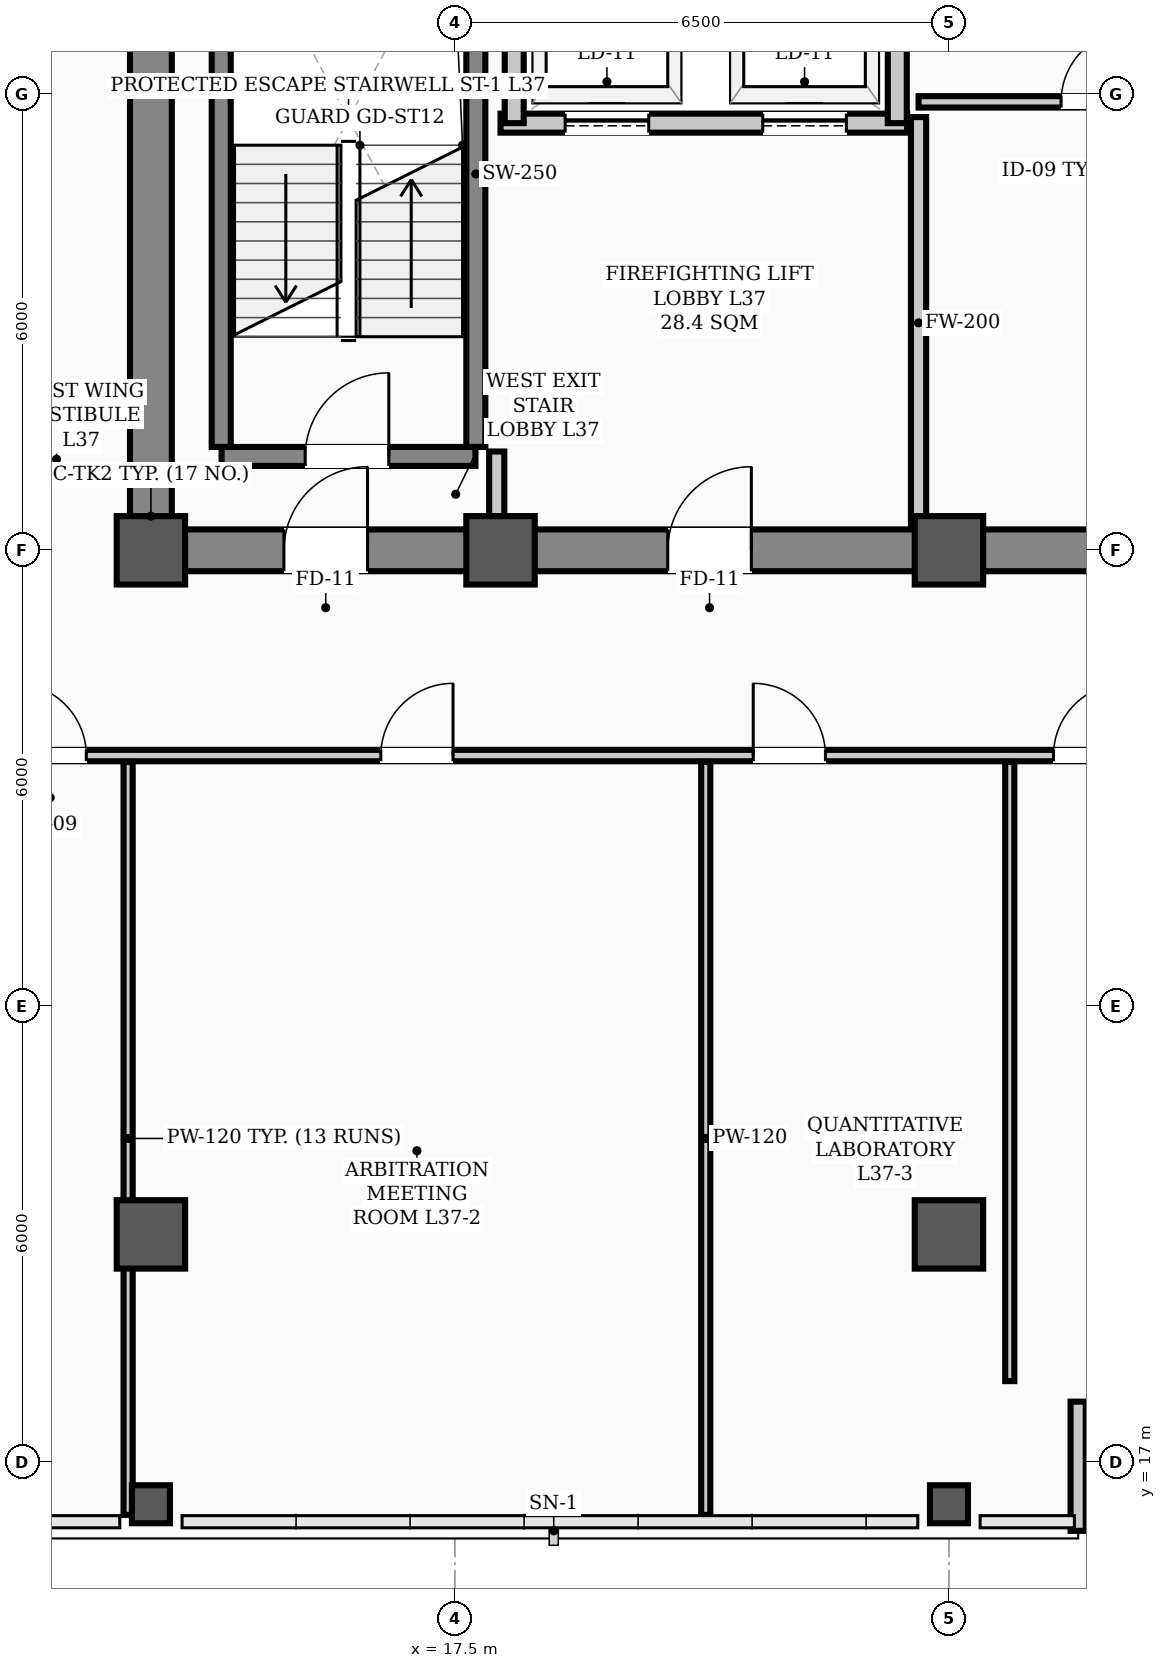
"""IFC4 building model, lengths in metres.
Left out: names, types, materials, properties, quantities, classifications, styles, units other than length and angle.
Written with IfcOpenShell. Run it as: python <this file> out.ifc"""

import sys

from ifc_helpers import new_model, si_unit, direction, frame, frame_2d, origin, origin_2d, place, context, subcontext, project, spatial, rectangle, hollow_rectangle, extrude, element, fill, save


model = new_model("IFC4")
c1 = context("Model", 3, precision=1e-05, world=origin(), true_north=direction((0.0, 1.0)))
c2 = subcontext(c1, "Body", "Model", "MODEL_VIEW")
j1 = project(units=[si_unit("LENGTHUNIT", "METRE"), si_unit("PLANEANGLEUNIT", "RADIAN")], contexts=[c1])
p1 = place(None, origin())
s1 = spatial("IfcSite", under=j1, at=p1, CompositionType="ELEMENT")
p2 = place(p1, origin())
s2 = spatial("IfcBuilding", under=s1, at=p2, CompositionType="ELEMENT")
p3 = place(p2, frame((0.0, 0.0, 150.0)))
s3 = spatial("IfcBuildingStorey", under=s2, at=p3, CompositionType="ELEMENT", Elevation=150.0)
for number, where, z_axis, x_axis in (
    (1, (13.5, 29.0, 0.0), (0.0, 0.0, 1.0), (1.0, 0.0, 0.0)),
    (2, (18.1, 29.0, 0.0), (0.0, 0.0, 1.0), (1.0, 0.0, 0.0)),
    (3, (24.0, 29.0, 0.0), (0.0, 0.0, 1.0), (1.0, 0.0, 0.0)),
    (4, (13.5, 20.0, 0.0), (0.0, 0.0, 1.0), (1.0, 0.0, 0.0)),
    (5, (24.0, 20.0, 0.0), (0.0, 0.0, 1.0), (1.0, 0.0, 0.0)),
):
    element("IfcColumn", number, at=place(p3, frame(where, z_axis=z_axis, x_axis=x_axis)), inside=s3, PredefinedType="COLUMN", context=c2, shape_type="SweptSolid", body=[
        extrude(hollow_rectangle(XDim=0.9, YDim=0.9, WallThickness=0.035, InnerFilletRadius=0.017, OuterFilletRadius=0.052, at=origin_2d()), origin(), (0.0, 0.0, 1.0), 3.9),
    ])
for number, where, z_axis, x_axis in (
    (6, (13.5, 16.45, 0.0), (0.0, 0.0, 1.0), (1.0, 0.0, 0.0)),
    (7, (24.0, 16.45, 0.0), (0.0, 0.0, 1.0), (1.0, 0.0, 0.0)),
):
    element("IfcColumn", number, at=place(p3, frame(where, z_axis=z_axis, x_axis=x_axis)), inside=s3, PredefinedType="COLUMN", context=c2, shape_type="SweptSolid", body=[
        extrude(hollow_rectangle(XDim=0.5, YDim=0.5, WallThickness=0.024, InnerFilletRadius=0.012, OuterFilletRadius=0.036, at=origin_2d()), origin(), (0.0, 0.0, 1.0), 3.9),
    ])
p4 = place(p3, frame((25.7, 16.1, 0.0), z_axis=(0.0, 0.0, 1.0), x_axis=(0.0, 1.0, 0.0)))
e8 = element("IfcWall", 8, at=p4, inside=s3, PredefinedType="PARAPET", context=c2, shape_type="SweptSolid", body=[
    extrude(rectangle(XDim=1.7, YDim=0.2, at=frame_2d((0.85, 0.0))), origin(), (0.0, 0.0, 1.0), 1.2),
])
p5 = place(p3, frame((13.5, 29.0, 0.0), z_axis=(0.0, 0.0, 1.0), x_axis=(1.0, 0.0, 0.0)))
e9 = element("IfcWall", 9, at=p5, inside=s3, PredefinedType="SHEAR", context=c2, shape_type="SweptSolid", body=[
    extrude(rectangle(XDim=30.5, YDim=0.55, at=frame_2d((15.25, 0.0))), origin(), (0.0, 0.0, 1.0), 3.72),
])
p6 = place(p5, frame((1.75, 0.0, 0.0)))
e10 = element("IfcOpeningElement", 10, at=p6, cuts=e9, PredefinedType="OPENING", context=c2, shape_type="SweptSolid", body=[
    extrude(rectangle(XDim=1.1, YDim=2.08, at=frame_2d((0.55, 1.04))), frame((0.0, 0.285, 0.0), z_axis=(0.0, -1.0, 0.0), x_axis=(1.0, 0.0, 0.0)), (0.0, 0.0, 1.0), 0.57),
])
p7 = place(p5, frame((26.7, 0.0, 0.0)))
e11 = element("IfcOpeningElement", 11, at=p7, cuts=e9, PredefinedType="OPENING", context=c2, shape_type="SweptSolid", body=[
    extrude(rectangle(XDim=1.1, YDim=2.08, at=frame_2d((0.55, 1.04))), frame((0.0, 0.285, 0.0), z_axis=(0.0, -1.0, 0.0), x_axis=(1.0, 0.0, 0.0)), (0.0, 0.0, 1.0), 0.57),
])
p8 = place(p5, frame((6.8, 0.0, 0.0)))
e12 = element("IfcOpeningElement", 12, at=p8, cuts=e9, PredefinedType="OPENING", context=c2, shape_type="SweptSolid", body=[
    extrude(rectangle(XDim=1.1, YDim=2.08, at=frame_2d((0.55, 1.04))), frame((0.0, 0.285, 0.0), z_axis=(0.0, -1.0, 0.0), x_axis=(1.0, 0.0, 0.0)), (0.0, 0.0, 1.0), 0.57),
])
p9 = place(p5, frame((13.2, 0.0, 0.0)))
e13 = element("IfcOpeningElement", 13, at=p9, cuts=e9, PredefinedType="OPENING", context=c2, shape_type="SweptSolid", body=[
    extrude(rectangle(XDim=1.6, YDim=2.08, at=frame_2d((0.8, 1.04))), frame((0.0, 0.285, 0.0), z_axis=(0.0, -1.0, 0.0), x_axis=(1.0, 0.0, 0.0)), (0.0, 0.0, 1.0), 0.57),
])
p10 = place(p5, frame((19.5, 0.0, 0.0)))
e14 = element("IfcOpeningElement", 14, at=p10, cuts=e9, PredefinedType="OPENING", context=c2, shape_type="SweptSolid", body=[
    extrude(rectangle(XDim=0.9, YDim=2.08, at=frame_2d((0.45, 1.04))), frame((0.0, 0.285, 0.0), z_axis=(0.0, -1.0, 0.0), x_axis=(1.0, 0.0, 0.0)), (0.0, 0.0, 1.0), 0.57),
])
p11 = place(p5, frame((21.55, 0.0, 0.0)))
e15 = element("IfcOpeningElement", 15, at=p11, cuts=e9, PredefinedType="OPENING", context=c2, shape_type="SweptSolid", body=[
    extrude(rectangle(XDim=0.9, YDim=2.08, at=frame_2d((0.45, 1.04))), frame((0.0, 0.285, 0.0), z_axis=(0.0, -1.0, 0.0), x_axis=(1.0, 0.0, 0.0)), (0.0, 0.0, 1.0), 0.57),
])
p12 = place(p3, frame((13.5, 29.35, 0.0), z_axis=(0.0, 0.0, 1.0), x_axis=(0.0, 1.0, 0.0)))
e16 = element("IfcWall", 16, at=p12, inside=s3, PredefinedType="SHEAR", context=c2, shape_type="SweptSolid", body=[
    extrude(rectangle(XDim=8.6, YDim=0.55, at=frame_2d((4.3, 0.0))), origin(), (0.0, 0.0, 1.0), 3.72),
])
p13 = place(p3, frame((14.43, 30.235, 0.0), z_axis=(0.0, 0.0, 1.0), x_axis=(1.0, 0.0, 0.0)))
e17 = element("IfcWall", 17, at=p13, inside=s3, PredefinedType="STANDARD", context=c2, shape_type="SweptSolid", body=[
    extrude(rectangle(XDim=3.34, YDim=0.25, at=frame_2d((1.67, 0.0))), origin(), (0.0, 0.0, 1.0), 3.72),
])
p14 = place(p13, frame((1.1, 0.0, 0.0)))
e18 = element("IfcOpeningElement", 18, at=p14, cuts=e17, PredefinedType="OPENING", context=c2, shape_type="SweptSolid", body=[
    extrude(rectangle(XDim=1.1, YDim=2.08, at=frame_2d((0.55, 1.04))), frame((0.0, 0.135, 0.0), z_axis=(0.0, -1.0, 0.0), x_axis=(1.0, 0.0, 0.0)), (0.0, 0.0, 1.0), 0.27),
])
for number, where, z_axis, x_axis in (
    (19, (14.425, 30.36, 0.0), (0.0, 0.0, 1.0), (0.0, 1.0, 0.0)),
    (20, (17.775, 30.36, 0.0), (0.0, 0.0, 1.0), (0.0, 1.0, 0.0)),
):
    element("IfcWall", number, at=place(p3, frame(where, z_axis=z_axis, x_axis=x_axis)), inside=s3, PredefinedType="STANDARD", context=c2, shape_type="SweptSolid", body=[
        extrude(rectangle(XDim=7.184, YDim=0.25, at=frame_2d((3.592, 0.0))), origin(), (0.0, 0.0, 1.0), 3.72),
    ])
p15 = place(p3, frame((18.1, 34.62, 0.0), z_axis=(0.0, 0.0, 1.0), x_axis=(1.0, 0.0, 0.0)))
e21 = element("IfcWall", 21, at=p15, inside=s3, PredefinedType="STANDARD", context=c2, shape_type="SweptSolid", body=[
    extrude(rectangle(XDim=5.35, YDim=0.25, at=frame_2d((2.675, 0.0))), origin(), (0.0, 0.0, 1.0), 3.72),
])
p16 = place(p15, frame((0.85, 0.0, 0.0)))
e22 = element("IfcOpeningElement", 22, at=p16, cuts=e21, PredefinedType="OPENING", context=c2, shape_type="SweptSolid", body=[
    extrude(rectangle(XDim=1.1, YDim=2.08, at=frame_2d((0.55, 1.04))), frame((0.0, 0.135, 0.0), z_axis=(0.0, -1.0, 0.0), x_axis=(1.0, 0.0, 0.0)), (0.0, 0.0, 1.0), 0.27),
])
p17 = place(p15, frame((3.45, 0.0, 0.0)))
e23 = element("IfcOpeningElement", 23, at=p17, cuts=e21, PredefinedType="OPENING", context=c2, shape_type="SweptSolid", body=[
    extrude(rectangle(XDim=1.1, YDim=2.08, at=frame_2d((0.55, 1.04))), frame((0.0, 0.135, 0.0), z_axis=(0.0, -1.0, 0.0), x_axis=(1.0, 0.0, 0.0)), (0.0, 0.0, 1.0), 0.27),
])
for number, where, z_axis, x_axis in (
    (24, (18.28, 34.62, 0.0), (0.0, 0.0, 1.0), (0.0, 1.0, 0.0)),
    (25, (23.32, 34.62, 0.0), (0.0, 0.0, 1.0), (0.0, 1.0, 0.0)),
):
    element("IfcWall", number, at=place(p3, frame(where, z_axis=z_axis, x_axis=x_axis)), inside=s3, PredefinedType="STANDARD", context=c2, shape_type="SweptSolid", body=[
        extrude(rectangle(XDim=3.33, YDim=0.25, at=frame_2d((1.665, 0.0))), origin(), (0.0, 0.0, 1.0), 3.35),
    ])
p18 = place(p3, frame((23.6, 34.9, 0.0), z_axis=(0.0, 0.0, 1.0), x_axis=(1.0, 0.0, 0.0)))
e26 = element("IfcWall", 26, at=p18, inside=s3, PredefinedType="PARTITIONING", context=c2, shape_type="SweptSolid", body=[
    extrude(rectangle(XDim=4.58, YDim=0.15, at=frame_2d((2.29, 0.0))), origin(), (0.0, 0.0, 1.0), 3.72),
])
p19 = place(p18, frame((1.875, 0.0, 0.0)))
e27 = element("IfcOpeningElement", 27, at=p19, cuts=e26, PredefinedType="OPENING", context=c2, shape_type="SweptSolid", body=[
    extrude(rectangle(XDim=0.95, YDim=2.08, at=frame_2d((0.475, 1.04))), frame((0.0, 0.085, 0.0), z_axis=(0.0, -1.0, 0.0), x_axis=(1.0, 0.0, 0.0)), (0.0, 0.0, 1.0), 0.17),
])
p20 = place(p3, frame((2.31, 26.3, 0.0), z_axis=(0.0, 0.0, 1.0), x_axis=(1.0, 0.0, 0.0)))
e28 = element("IfcWall", 28, at=p20, inside=s3, PredefinedType="PARTITIONING", context=c2, shape_type="SweptSolid", body=[
    extrude(rectangle(XDim=46.38, YDim=0.15, at=frame_2d((23.19, 0.0))), origin(), (0.0, 0.0, 1.0), 3.2),
])
p21 = place(p20, frame((9.39, 0.0, 0.0)))
e29 = element("IfcOpeningElement", 29, at=p21, cuts=e28, PredefinedType="OPENING", context=c2, shape_type="SweptSolid", body=[
    extrude(rectangle(XDim=0.95, YDim=2.08, at=frame_2d((0.475, 1.04))), frame((0.0, 0.085, 0.0), z_axis=(0.0, -1.0, 0.0), x_axis=(1.0, 0.0, 0.0)), (0.0, 0.0, 1.0), 0.17),
])
p22 = place(p20, frame((14.215, 0.0, 0.0)))
e30 = element("IfcOpeningElement", 30, at=p22, cuts=e28, PredefinedType="OPENING", context=c2, shape_type="SweptSolid", body=[
    extrude(rectangle(XDim=0.95, YDim=2.08, at=frame_2d((0.475, 1.04))), frame((0.0, 0.085, 0.0), z_axis=(0.0, -1.0, 0.0), x_axis=(1.0, 0.0, 0.0)), (0.0, 0.0, 1.0), 0.17),
])
p23 = place(p20, frame((19.115, 0.0, 0.0)))
e31 = element("IfcOpeningElement", 31, at=p23, cuts=e28, PredefinedType="OPENING", context=c2, shape_type="SweptSolid", body=[
    extrude(rectangle(XDim=0.95, YDim=2.08, at=frame_2d((0.475, 1.04))), frame((0.0, 0.085, 0.0), z_axis=(0.0, -1.0, 0.0), x_axis=(1.0, 0.0, 0.0)), (0.0, 0.0, 1.0), 0.17),
])
p24 = place(p20, frame((23.065, 0.0, 0.0)))
e32 = element("IfcOpeningElement", 32, at=p24, cuts=e28, PredefinedType="OPENING", context=c2, shape_type="SweptSolid", body=[
    extrude(rectangle(XDim=0.95, YDim=2.08, at=frame_2d((0.475, 1.04))), frame((0.0, 0.085, 0.0), z_axis=(0.0, -1.0, 0.0), x_axis=(1.0, 0.0, 0.0)), (0.0, 0.0, 1.0), 0.17),
])
p25 = place(p20, frame((37.715, 0.0, 0.0)))
e33 = element("IfcOpeningElement", 33, at=p25, cuts=e28, PredefinedType="OPENING", context=c2, shape_type="SweptSolid", body=[
    extrude(rectangle(XDim=0.95, YDim=2.08, at=frame_2d((0.475, 1.04))), frame((0.0, 0.085, 0.0), z_axis=(0.0, -1.0, 0.0), x_axis=(1.0, 0.0, 0.0)), (0.0, 0.0, 1.0), 0.17),
])
p26 = place(p20, frame((43.66, 0.0, 0.0)))
e34 = element("IfcOpeningElement", 34, at=p26, cuts=e28, PredefinedType="OPENING", context=c2, shape_type="SweptSolid", body=[
    extrude(rectangle(XDim=0.95, YDim=2.08, at=frame_2d((0.475, 1.04))), frame((0.0, 0.085, 0.0), z_axis=(0.0, -1.0, 0.0), x_axis=(1.0, 0.0, 0.0)), (0.0, 0.0, 1.0), 0.17),
])
p27 = place(p3, frame((18.05, 29.285, 0.0), z_axis=(0.0, 0.0, 1.0), x_axis=(0.0, 1.0, 0.0)))
e35 = element("IfcWall", 35, at=p27, inside=s3, PredefinedType="STANDARD", context=c2, shape_type="SweptSolid", body=[
    extrude(rectangle(XDim=1.015, YDim=0.2, at=frame_2d((0.508, 0.0))), origin(), (0.0, 0.0, 1.0), 3.35),
])
p28 = place(p3, frame((23.6, 29.285, 0.0), z_axis=(0.0, 0.0, 1.0), x_axis=(0.0, 1.0, 0.0)))
e36 = element("IfcWall", 36, at=p28, inside=s3, PredefinedType="STANDARD", context=c2, shape_type="SweptSolid", body=[
    extrude(rectangle(XDim=5.415, YDim=0.2, at=frame_2d((2.708, 0.0))), origin(), (0.0, 0.0, 1.0), 3.2),
])
for number, where, z_axis, x_axis in (
    (37, (13.2, 16.31, 0.0), (0.0, 0.0, 1.0), (0.0, 1.0, 0.0)),
    (38, (20.8, 16.31, 0.0), (0.0, 0.0, 1.0), (0.0, 1.0, 0.0)),
):
    element("IfcWall", number, at=place(p3, frame(where, z_axis=z_axis, x_axis=x_axis)), inside=s3, PredefinedType="PARTITIONING", context=c2, shape_type="SweptSolid", body=[
        extrude(rectangle(XDim=9.905, YDim=0.12, at=frame_2d((4.953, 0.0))), origin(), (0.0, 0.0, 1.0), 3.1),
    ])
p29 = place(p3, frame((24.8, 18.07, 0.0), z_axis=(0.0, 0.0, 1.0), x_axis=(0.0, 1.0, 0.0)))
e39 = element("IfcWall", 39, at=p29, inside=s3, PredefinedType="PARTITIONING", context=c2, shape_type="SweptSolid", body=[
    extrude(rectangle(XDim=8.145, YDim=0.12, at=frame_2d((4.073, 0.0))), origin(), (0.0, 0.0, 1.0), 3.1),
])
p30 = place(p14, origin())
e40 = element("IfcDoor", 40, at=p30, inside=s3, OperationType="SINGLE_SWING_RIGHT", PredefinedType="DOOR", context=c2, shape_type="SweptSolid", body=[
    extrude(rectangle(XDim=1.1, YDim=2.08, at=frame_2d((0.55, 1.04))), frame((0.0, 0.025, 0.0), z_axis=(0.0, -1.0, 0.0), x_axis=(1.0, 0.0, 0.0)), (0.0, 0.0, 1.0), 0.05),
])
fill(e18, e40)
p31 = place(p6, origin())
e41 = element("IfcDoor", 41, at=p31, inside=s3, OperationType="SINGLE_SWING_RIGHT", PredefinedType="DOOR", context=c2, shape_type="SweptSolid", body=[
    extrude(rectangle(XDim=1.1, YDim=2.08, at=frame_2d((0.55, 1.04))), frame((0.0, 0.025, 0.0), z_axis=(0.0, -1.0, 0.0), x_axis=(1.0, 0.0, 0.0)), (0.0, 0.0, 1.0), 0.05),
])
fill(e10, e41)
p32 = place(p8, origin())
e42 = element("IfcDoor", 42, at=p32, inside=s3, OperationType="SINGLE_SWING_RIGHT", PredefinedType="DOOR", context=c2, shape_type="SweptSolid", body=[
    extrude(rectangle(XDim=1.1, YDim=2.08, at=frame_2d((0.55, 1.04))), frame((0.0, 0.025, 0.0), z_axis=(0.0, -1.0, 0.0), x_axis=(1.0, 0.0, 0.0)), (0.0, 0.0, 1.0), 0.05),
])
fill(e12, e42)
p33 = place(p19, origin())
e43 = element("IfcDoor", 43, at=p33, inside=s3, OperationType="SINGLE_SWING_RIGHT", PredefinedType="DOOR", context=c2, shape_type="SweptSolid", body=[
    extrude(rectangle(XDim=0.95, YDim=2.08, at=frame_2d((0.475, 1.04))), frame((0.0, 0.025, 0.0), z_axis=(0.0, -1.0, 0.0), x_axis=(1.0, 0.0, 0.0)), (0.0, 0.0, 1.0), 0.05),
])
fill(e27, e43)
p34 = place(p21, origin())
e44 = element("IfcDoor", 44, at=p34, inside=s3, OperationType="SINGLE_SWING_LEFT", PredefinedType="DOOR", context=c2, shape_type="SweptSolid", body=[
    extrude(rectangle(XDim=0.95, YDim=2.08, at=frame_2d((0.475, 1.04))), frame((0.0, 0.025, 0.0), z_axis=(0.0, -1.0, 0.0), x_axis=(1.0, 0.0, 0.0)), (0.0, 0.0, 1.0), 0.05),
])
fill(e29, e44)
p35 = place(p22, origin())
e45 = element("IfcDoor", 45, at=p35, inside=s3, OperationType="SINGLE_SWING_RIGHT", PredefinedType="DOOR", context=c2, shape_type="SweptSolid", body=[
    extrude(rectangle(XDim=0.95, YDim=2.08, at=frame_2d((0.475, 1.04))), frame((0.0, 0.025, 0.0), z_axis=(0.0, -1.0, 0.0), x_axis=(1.0, 0.0, 0.0)), (0.0, 0.0, 1.0), 0.05),
])
fill(e30, e45)
p36 = place(p23, origin())
e46 = element("IfcDoor", 46, at=p36, inside=s3, OperationType="SINGLE_SWING_LEFT", PredefinedType="DOOR", context=c2, shape_type="SweptSolid", body=[
    extrude(rectangle(XDim=0.95, YDim=2.08, at=frame_2d((0.475, 1.04))), frame((0.0, 0.025, 0.0), z_axis=(0.0, -1.0, 0.0), x_axis=(1.0, 0.0, 0.0)), (0.0, 0.0, 1.0), 0.05),
])
fill(e31, e46)
p37 = place(p24, origin())
e47 = element("IfcDoor", 47, at=p37, inside=s3, OperationType="SINGLE_SWING_RIGHT", PredefinedType="DOOR", context=c2, shape_type="SweptSolid", body=[
    extrude(rectangle(XDim=0.95, YDim=2.08, at=frame_2d((0.475, 1.04))), frame((0.0, 0.025, 0.0), z_axis=(0.0, -1.0, 0.0), x_axis=(1.0, 0.0, 0.0)), (0.0, 0.0, 1.0), 0.05),
])
fill(e32, e47)
p38 = place(p16, origin())
e48 = element("IfcDoor", 48, at=p38, inside=s3, OperationType="SLIDING_TO_LEFT", PredefinedType="DOOR", context=c2, shape_type="SweptSolid", body=[
    extrude(rectangle(XDim=1.1, YDim=2.08, at=frame_2d((0.55, 1.04))), frame((0.0, 0.025, 0.0), z_axis=(0.0, -1.0, 0.0), x_axis=(1.0, 0.0, 0.0)), (0.0, 0.0, 1.0), 0.05),
])
fill(e22, e48)
p39 = place(p17, origin())
e49 = element("IfcDoor", 49, at=p39, inside=s3, OperationType="SLIDING_TO_LEFT", PredefinedType="DOOR", context=c2, shape_type="SweptSolid", body=[
    extrude(rectangle(XDim=1.1, YDim=2.08, at=frame_2d((0.55, 1.04))), frame((0.0, 0.025, 0.0), z_axis=(0.0, -1.0, 0.0), x_axis=(1.0, 0.0, 0.0)), (0.0, 0.0, 1.0), 0.05),
])
fill(e23, e49)
save(model, sys.argv[1])
